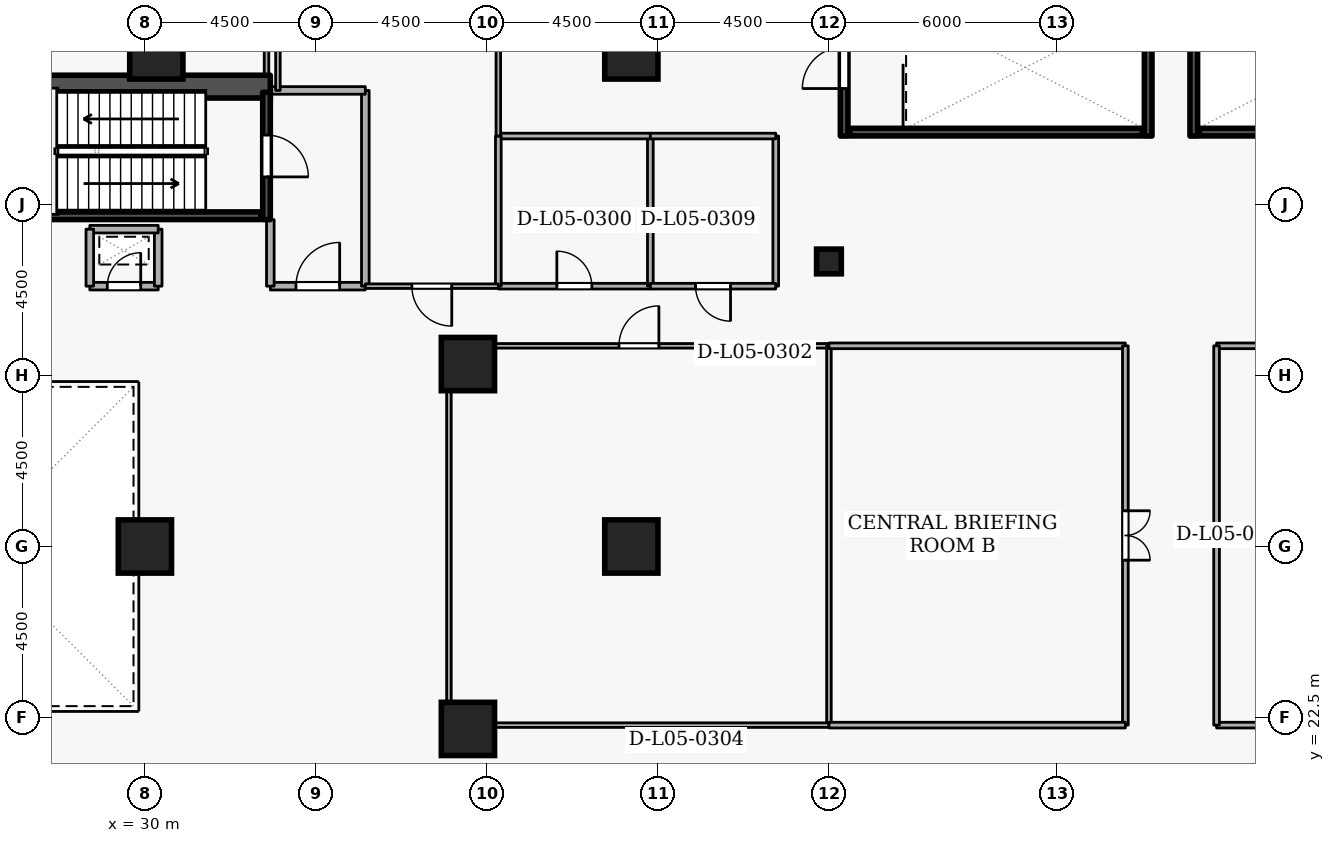
"""IFC4 building model, lengths in metres.
Left out: names, types, materials, properties, quantities, classifications, styles, units other than length and angle.
Written with IfcOpenShell. Run it as: python <this file> out.ifc"""

import sys

from ifc_helpers import new_model, si_unit, direction, frame, frame_2d, origin, origin_2d, place, context, subcontext, project, spatial, rectangle, extrude, element, fill, save


model = new_model("IFC4")
c1 = context("Model", 3, precision=1e-05, world=origin(), true_north=direction((0.0, 1.0)))
c2 = subcontext(c1, "Body", "Model", "MODEL_VIEW")
j1 = project(units=[si_unit("LENGTHUNIT", "METRE"), si_unit("PLANEANGLEUNIT", "RADIAN")], contexts=[c1])
p1 = place(None, origin())
s1 = spatial("IfcSite", under=j1, at=p1, CompositionType="ELEMENT")
p2 = place(p1, origin())
s2 = spatial("IfcBuilding", under=s1, at=p2, CompositionType="ELEMENT")
p3 = place(p2, frame((0.0, 0.0, 23.1)))
s3 = spatial("IfcBuildingStorey", under=s2, at=p3, CompositionType="ELEMENT", Elevation=23.1)
p4 = place(p3, frame((17.7, 39.1, 0.0), z_axis=(0.0, 0.0, 1.0), x_axis=(1.0, 0.0, 0.0)))
e1 = element("IfcWall", 1, at=p4, inside=s3, PredefinedType="SHEAR", context=c2, shape_type="SweptSolid", body=[
    extrude(rectangle(XDim=15.6, YDim=0.6, at=frame_2d((7.8, 0.0))), origin(), (0.0, 0.0, 1.0), 4.8),
])
for number, where, z_axis, x_axis in (
    (2, (42.8, 27.0, 0.0), (0.0, 0.0, 1.0), (1.0, 0.0, 0.0)),
    (3, (42.8, 40.0, 0.0), (0.0, 0.0, 1.0), (1.0, 0.0, 0.0)),
    (4, (38.5, 22.2, 0.0), (0.0, 0.0, 1.0), (1.0, 0.0, 0.0)),
    (5, (38.5, 31.8, 0.0), (0.0, 0.0, 1.0), (1.0, 0.0, 0.0)),
    (6, (30.3, 40.0, 0.0), (0.0, 0.0, 1.0), (1.0, 0.0, 0.0)),
    (7, (30.0, 27.0, 0.0), (0.0, 0.0, 1.0), (1.0, 0.0, 0.0)),
):
    element("IfcColumn", number, at=place(p3, frame(where, z_axis=z_axis, x_axis=x_axis)), inside=s3, PredefinedType="COLUMN", context=c2, shape_type="SweptSolid", body=[
        extrude(rectangle(XDim=1.4, YDim=1.4, at=origin_2d()), origin(), (0.0, 0.0, 1.0), 4.8),
    ])
p5 = place(p3, frame((48.0, 34.5, 0.0), z_axis=(0.0, 0.0, 1.0), x_axis=(1.0, 0.0, 0.0)))
e8 = element("IfcColumn", 8, at=p5, inside=s3, PredefinedType="COLUMN", context=c2, shape_type="SweptSolid", body=[
    extrude(rectangle(XDim=0.65, YDim=0.65, at=origin_2d()), origin(), (0.0, 0.0, 1.0), 4.8),
])
p6 = place(p3, frame((33.2, 38.95, 0.0), z_axis=(0.0, 0.0, 1.0), x_axis=(0.0, -1.0, 0.0)))
e9 = element("IfcWall", 9, at=p6, inside=s3, PredefinedType="SHEAR", context=c2, shape_type="SweptSolid", body=[
    extrude(rectangle(XDim=3.35, YDim=0.2, at=frame_2d((1.675, 0.0))), origin(), (0.0, 0.0, 1.0), 4.8),
])
p7 = place(p6, frame((1.125, 0.0, 0.0)))
e10 = element("IfcOpeningElement", 10, at=p7, cuts=e9, PredefinedType="OPENING", context=c2, shape_type="SweptSolid", body=[
    extrude(rectangle(XDim=1.1, YDim=2.1, at=frame_2d((0.55, 1.05))), frame((0.0, 0.11, 0.0), z_axis=(0.0, -1.0, 0.0), x_axis=(1.0, 0.0, 0.0)), (0.0, 0.0, 1.0), 0.22),
])
p8 = place(p3, frame((25.95, 35.703, 0.0), z_axis=(0.0, 0.0, 1.0), x_axis=(1.0, 0.0, 0.0)))
e11 = element("IfcWall", 11, at=p8, inside=s3, PredefinedType="SHEAR", context=c2, shape_type="SweptSolid", body=[
    extrude(rectangle(XDim=7.1, YDim=0.2, at=frame_2d((3.55, 0.0))), origin(), (0.0, 0.0, 1.0), 4.8),
])
p9 = place(p3, frame((48.4, 37.8, 0.0), z_axis=(0.0, 0.0, 1.0), x_axis=(0.0, 1.0, 0.0)))
e12 = element("IfcWall", 12, at=p9, inside=s3, PredefinedType="SHEAR", context=c2, shape_type="SweptSolid", body=[
    extrude(rectangle(XDim=3.6, YDim=0.2, at=frame_2d((1.8, 0.0))), origin(), (0.0, 0.0, 1.0), 4.8),
])
p10 = place(p9, frame((1.25, 0.0, 0.0)))
e13 = element("IfcOpeningElement", 13, at=p10, cuts=e12, PredefinedType="OPENING", context=c2, shape_type="SweptSolid", body=[
    extrude(rectangle(XDim=1.1, YDim=2.1, at=frame_2d((0.55, 1.05))), frame((0.0, 0.11, 0.0), z_axis=(0.0, -1.0, 0.0), x_axis=(1.0, 0.0, 0.0)), (0.0, 0.0, 1.0), 0.22),
])
p11 = place(p3, frame((56.4, 41.4, 0.0), z_axis=(0.0, 0.0, 1.0), x_axis=(0.0, -1.0, 0.0)))
e14 = element("IfcWall", 14, at=p11, inside=s3, PredefinedType="SHEAR", context=c2, shape_type="SweptSolid", body=[
    extrude(rectangle(XDim=3.6, YDim=0.2, at=frame_2d((1.8, 0.0))), origin(), (0.0, 0.0, 1.0), 4.8),
])
p12 = place(p3, frame((48.55, 37.903, 0.0), z_axis=(0.0, 0.0, 1.0), x_axis=(1.0, 0.0, 0.0)))
e15 = element("IfcWall", 15, at=p12, inside=s3, PredefinedType="SHEAR", context=c2, shape_type="SweptSolid", body=[
    extrude(rectangle(XDim=7.7, YDim=0.2, at=frame_2d((3.85, 0.0))), origin(), (0.0, 0.0, 1.0), 4.8),
])
p13 = place(p3, frame((57.6, 37.8, 0.0), z_axis=(0.0, 0.0, 1.0), x_axis=(0.0, 1.0, 0.0)))
e16 = element("IfcWall", 16, at=p13, inside=s3, PredefinedType="SHEAR", context=c2, shape_type="SweptSolid", body=[
    extrude(rectangle(XDim=3.6, YDim=0.2, at=frame_2d((1.8, 0.0))), origin(), (0.0, 0.0, 1.0), 4.8),
])
p14 = place(p3, frame((57.75, 37.903, 0.0), z_axis=(0.0, 0.0, 1.0), x_axis=(1.0, 0.0, 0.0)))
e17 = element("IfcWall", 17, at=p14, inside=s3, PredefinedType="SHEAR", context=c2, shape_type="SweptSolid", body=[
    extrude(rectangle(XDim=7.7, YDim=0.2, at=frame_2d((3.85, 0.0))), origin(), (0.0, 0.0, 1.0), 4.8),
])
p15 = place(p3, frame((33.3, 33.85, 0.0), z_axis=(0.0, 0.0, 1.0), x_axis=(1.0, 0.0, 0.0)))
e18 = element("IfcWall", 18, at=p15, inside=s3, PredefinedType="STANDARD", context=c2, shape_type="SweptSolid", body=[
    extrude(rectangle(XDim=2.5, YDim=0.2, at=frame_2d((1.25, 0.0))), origin(), (0.0, 0.0, 1.0), 4.54),
])
p16 = place(p15, frame((0.675, 0.0, 0.0)))
e19 = element("IfcOpeningElement", 19, at=p16, cuts=e18, PredefinedType="OPENING", context=c2, shape_type="SweptSolid", body=[
    extrude(rectangle(XDim=1.15, YDim=2.1, at=frame_2d((0.575, 1.05))), frame((0.0, 0.11, 0.0), z_axis=(0.0, -1.0, 0.0), x_axis=(1.0, 0.0, 0.0)), (0.0, 0.0, 1.0), 0.22),
])
p17 = place(p3, frame((35.8, 33.85, 0.0), z_axis=(0.0, 0.0, 1.0), x_axis=(0.0, 1.0, 0.0)))
e20 = element("IfcWall", 20, at=p17, inside=s3, PredefinedType="STANDARD", context=c2, shape_type="SweptSolid", body=[
    extrude(rectangle(XDim=5.15, YDim=0.2, at=frame_2d((2.575, 0.0))), origin(), (0.0, 0.0, 1.0), 4.54),
])
p18 = place(p3, frame((35.8, 39.0, 0.0), z_axis=(0.0, 0.0, 1.0), x_axis=(-1.0, 0.0, 0.0)))
e21 = element("IfcWall", 21, at=p18, inside=s3, PredefinedType="STANDARD", context=c2, shape_type="SweptSolid", body=[
    extrude(rectangle(XDim=2.5, YDim=0.2, at=frame_2d((1.25, 0.0))), origin(), (0.0, 0.0, 1.0), 4.54),
])
p19 = place(p3, frame((33.3, 35.6, 0.0), z_axis=(0.0, 0.0, 1.0), x_axis=(0.0, -1.0, 0.0)))
e22 = element("IfcWall", 22, at=p19, inside=s3, PredefinedType="STANDARD", context=c2, shape_type="SweptSolid", body=[
    extrude(rectangle(XDim=1.75, YDim=0.2, at=frame_2d((0.875, 0.0))), origin(), (0.0, 0.0, 1.0), 3.745),
])
p20 = place(p3, frame((28.55, 33.85, 0.0), z_axis=(0.0, 0.0, 1.0), x_axis=(1.0, 0.0, 0.0)))
e23 = element("IfcWall", 23, at=p20, inside=s3, PredefinedType="STANDARD", context=c2, shape_type="SweptSolid", body=[
    extrude(rectangle(XDim=1.8, YDim=0.2, at=frame_2d((0.9, 0.0))), origin(), (0.0, 0.0, 1.0), 4.54),
])
p21 = place(p20, frame((0.46, 0.0, 0.0)))
e24 = element("IfcOpeningElement", 24, at=p21, cuts=e23, PredefinedType="OPENING", context=c2, shape_type="SweptSolid", body=[
    extrude(rectangle(XDim=0.88, YDim=2.04, at=frame_2d((0.44, 1.02))), frame((0.0, 0.11, 0.0), z_axis=(0.0, -1.0, 0.0), x_axis=(1.0, 0.0, 0.0)), (0.0, 0.0, 1.0), 0.22),
])
p22 = place(p3, frame((30.35, 33.85, 0.0), z_axis=(0.0, 0.0, 1.0), x_axis=(0.0, 1.0, 0.0)))
e25 = element("IfcWall", 25, at=p22, inside=s3, PredefinedType="STANDARD", context=c2, shape_type="SweptSolid", body=[
    extrude(rectangle(XDim=1.5, YDim=0.2, at=frame_2d((0.75, 0.0))), origin(), (0.0, 0.0, 1.0), 4.54),
])
p23 = place(p3, frame((30.35, 35.35, 0.0), z_axis=(0.0, 0.0, 1.0), x_axis=(-1.0, 0.0, 0.0)))
e26 = element("IfcWall", 26, at=p23, inside=s3, PredefinedType="STANDARD", context=c2, shape_type="SweptSolid", body=[
    extrude(rectangle(XDim=1.8, YDim=0.2, at=frame_2d((0.9, 0.0))), origin(), (0.0, 0.0, 1.0), 4.54),
])
p24 = place(p3, frame((28.55, 35.35, 0.0), z_axis=(0.0, 0.0, 1.0), x_axis=(0.0, -1.0, 0.0)))
e27 = element("IfcWall", 27, at=p24, inside=s3, PredefinedType="STANDARD", context=c2, shape_type="SweptSolid", body=[
    extrude(rectangle(XDim=1.5, YDim=0.2, at=frame_2d((0.75, 0.0))), origin(), (0.0, 0.0, 1.0), 4.54),
])
p25 = place(p3, frame((39.3, 33.85, 0.0), z_axis=(0.0, 0.0, 1.0), x_axis=(1.0, 0.0, 0.0)))
e28 = element("IfcWall", 28, at=p25, inside=s3, PredefinedType="PARTITIONING", context=c2, shape_type="SweptSolid", body=[
    extrude(rectangle(XDim=4.0, YDim=0.15, at=frame_2d((2.0, 0.0))), origin(), (0.0, 0.0, 1.0), 4.54),
])
p26 = place(p25, frame((1.54, 0.0, 0.0)))
e29 = element("IfcOpeningElement", 29, at=p26, cuts=e28, PredefinedType="OPENING", context=c2, shape_type="SweptSolid", body=[
    extrude(rectangle(XDim=0.92, YDim=2.08, at=frame_2d((0.46, 1.04))), frame((0.0, 0.085, 0.0), z_axis=(0.0, -1.0, 0.0), x_axis=(1.0, 0.0, 0.0)), (0.0, 0.0, 1.0), 0.17),
])
p27 = place(p3, frame((43.3, 33.85, 0.0), z_axis=(0.0, 0.0, 1.0), x_axis=(0.0, 1.0, 0.0)))
e30 = element("IfcWall", 30, at=p27, inside=s3, PredefinedType="PARTITIONING", context=c2, shape_type="SweptSolid", body=[
    extrude(rectangle(XDim=3.95, YDim=0.15, at=frame_2d((1.975, 0.0))), origin(), (0.0, 0.0, 1.0), 4.54),
])
p28 = place(p3, frame((43.3, 37.8, 0.0), z_axis=(0.0, 0.0, 1.0), x_axis=(-1.0, 0.0, 0.0)))
e31 = element("IfcWall", 31, at=p28, inside=s3, PredefinedType="PARTITIONING", context=c2, shape_type="SweptSolid", body=[
    extrude(rectangle(XDim=4.0, YDim=0.15, at=frame_2d((2.0, 0.0))), origin(), (0.0, 0.0, 1.0), 4.54),
])
for number, where, z_axis, x_axis in (
    (32, (39.3, 37.8, 0.0), (0.0, 0.0, 1.0), (0.0, -1.0, 0.0)),
    (33, (46.6, 37.8, 0.0), (0.0, 0.0, 1.0), (0.0, -1.0, 0.0)),
):
    element("IfcWall", number, at=place(p3, frame(where, z_axis=z_axis, x_axis=x_axis)), inside=s3, PredefinedType="PARTITIONING", context=c2, shape_type="SweptSolid", body=[
        extrude(rectangle(XDim=3.95, YDim=0.15, at=frame_2d((1.975, 0.0))), origin(), (0.0, 0.0, 1.0), 4.54),
    ])
p29 = place(p3, frame((46.6, 33.85, 0.0), z_axis=(0.0, 0.0, 1.0), x_axis=(-1.0, 0.0, 0.0)))
e34 = element("IfcWall", 34, at=p29, inside=s3, PredefinedType="PARTITIONING", context=c2, shape_type="SweptSolid", body=[
    extrude(rectangle(XDim=3.3, YDim=0.15, at=frame_2d((1.65, 0.0))), origin(), (0.0, 0.0, 1.0), 4.54),
])
p30 = place(p29, frame((1.19, 0.0, 0.0)))
e35 = element("IfcOpeningElement", 35, at=p30, cuts=e34, PredefinedType="OPENING", context=c2, shape_type="SweptSolid", body=[
    extrude(rectangle(XDim=0.92, YDim=2.08, at=frame_2d((0.46, 1.04))), frame((0.0, 0.085, 0.0), z_axis=(0.0, -1.0, 0.0), x_axis=(1.0, 0.0, 0.0)), (0.0, 0.0, 1.0), 0.17),
])
p31 = place(p3, frame((43.3, 37.8, 0.0), z_axis=(0.0, 0.0, 1.0), x_axis=(1.0, 0.0, 0.0)))
e36 = element("IfcWall", 36, at=p31, inside=s3, PredefinedType="PARTITIONING", context=c2, shape_type="SweptSolid", body=[
    extrude(rectangle(XDim=3.3, YDim=0.15, at=frame_2d((1.65, 0.0))), origin(), (0.0, 0.0, 1.0), 4.54),
])
p32 = place(p3, frame((38.0, 32.28, 0.0), z_axis=(0.0, 0.0, 1.0), x_axis=(1.0, 0.0, 0.0)))
e37 = element("IfcWall", 37, at=p32, inside=s3, PredefinedType="PARTITIONING", context=c2, shape_type="SweptSolid", body=[
    extrude(rectangle(XDim=10.0, YDim=0.12, at=frame_2d((5.0, 0.0))), origin(), (0.0, 0.0, 1.0), 4.54),
])
p33 = place(p32, frame((4.475, 0.0, 0.0)))
e38 = element("IfcOpeningElement", 38, at=p33, cuts=e37, PredefinedType="OPENING", context=c2, shape_type="SweptSolid", body=[
    extrude(rectangle(XDim=1.05, YDim=2.1, at=frame_2d((0.525, 1.05))), frame((0.0, 0.07, 0.0), z_axis=(0.0, -1.0, 0.0), x_axis=(1.0, 0.0, 0.0)), (0.0, 0.0, 1.0), 0.14),
])
p34 = place(p3, frame((48.0, 32.28, 0.0), z_axis=(0.0, 0.0, 1.0), x_axis=(0.0, -1.0, 0.0)))
e39 = element("IfcWall", 39, at=p34, inside=s3, PredefinedType="PARTITIONING", context=c2, shape_type="SweptSolid", body=[
    extrude(rectangle(XDim=9.98, YDim=0.12, at=frame_2d((4.99, 0.0))), origin(), (0.0, 0.0, 1.0), 3.694),
])
p35 = place(p3, frame((48.0, 22.3, 0.0), z_axis=(0.0, 0.0, 1.0), x_axis=(-1.0, 0.0, 0.0)))
e40 = element("IfcWall", 40, at=p35, inside=s3, PredefinedType="PARTITIONING", context=c2, shape_type="SweptSolid", body=[
    extrude(rectangle(XDim=10.0, YDim=0.12, at=frame_2d((5.0, 0.0))), origin(), (0.0, 0.0, 1.0), 4.54),
])
p36 = place(p3, frame((38.0, 22.3, 0.0), z_axis=(0.0, 0.0, 1.0), x_axis=(0.0, 1.0, 0.0)))
e41 = element("IfcWall", 41, at=p36, inside=s3, PredefinedType="PARTITIONING", context=c2, shape_type="SweptSolid", body=[
    extrude(rectangle(XDim=9.98, YDim=0.12, at=frame_2d((4.99, 0.0))), origin(), (0.0, 0.0, 1.0), 4.54),
])
p37 = place(p3, frame((58.2, 32.28, 0.0), z_axis=(0.0, 0.0, 1.0), x_axis=(1.0, 0.0, 0.0)))
e42 = element("IfcWall", 42, at=p37, inside=s3, PredefinedType="PARTITIONING", context=c2, shape_type="SweptSolid", body=[
    extrude(rectangle(XDim=13.85, YDim=0.15, at=frame_2d((6.925, 0.0))), origin(), (0.0, 0.0, 1.0), 4.54),
])
p38 = place(p37, frame((6.275, 0.0, 0.0)))
e43 = element("IfcOpeningElement", 43, at=p38, cuts=e42, PredefinedType="OPENING", context=c2, shape_type="SweptSolid", body=[
    extrude(rectangle(XDim=1.3, YDim=2.12, at=frame_2d((0.65, 1.06))), frame((0.0, 0.085, 0.0), z_axis=(0.0, -1.0, 0.0), x_axis=(1.0, 0.0, 0.0)), (0.0, 0.0, 1.0), 0.17),
])
p39 = place(p3, frame((72.05, 22.3, 0.0), z_axis=(0.0, 0.0, 1.0), x_axis=(-1.0, 0.0, 0.0)))
e44 = element("IfcWall", 44, at=p39, inside=s3, PredefinedType="PARTITIONING", context=c2, shape_type="SweptSolid", body=[
    extrude(rectangle(XDim=13.85, YDim=0.15, at=frame_2d((6.925, 0.0))), origin(), (0.0, 0.0, 1.0), 4.54),
])
p40 = place(p3, frame((58.2, 22.3, 0.0), z_axis=(0.0, 0.0, 1.0), x_axis=(0.0, 1.0, 0.0)))
e45 = element("IfcWall", 45, at=p40, inside=s3, PredefinedType="PARTITIONING", context=c2, shape_type="SweptSolid", body=[
    extrude(rectangle(XDim=9.98, YDim=0.15, at=frame_2d((4.99, 0.0))), origin(), (0.0, 0.0, 1.0), 4.54),
])
p41 = place(p3, frame((39.3, 49.18, 0.0), z_axis=(0.0, 0.0, 1.0), x_axis=(0.0, -1.0, 0.0)))
e46 = element("IfcWall", 46, at=p41, inside=s3, PredefinedType="PARTITIONING", context=c2, shape_type="SweptSolid", body=[
    extrude(rectangle(XDim=11.38, YDim=0.12, at=frame_2d((5.69, 0.0))), origin(), (0.0, 0.0, 1.0), 4.54),
])
p42 = place(p3, frame((39.3, 33.85, 0.0), z_axis=(0.0, 0.0, 1.0), x_axis=(-1.0, 0.0, 0.0)))
e47 = element("IfcWall", 47, at=p42, inside=s3, PredefinedType="PARTITIONING", context=c2, shape_type="SweptSolid", body=[
    extrude(rectangle(XDim=3.5, YDim=0.12, at=frame_2d((1.75, 0.0))), origin(), (0.0, 0.0, 1.0), 4.54),
])
p43 = place(p42, frame((1.225, 0.0, 0.0)))
e48 = element("IfcOpeningElement", 48, at=p43, cuts=e47, PredefinedType="OPENING", context=c2, shape_type="SweptSolid", body=[
    extrude(rectangle(XDim=1.05, YDim=2.1, at=frame_2d((0.525, 1.05))), frame((0.0, 0.07, 0.0), z_axis=(0.0, -1.0, 0.0), x_axis=(1.0, 0.0, 0.0)), (0.0, 0.0, 1.0), 0.14),
])
p44 = place(p3, frame((33.5, 39.0, 0.0), z_axis=(0.0, 0.0, 1.0), x_axis=(0.0, 1.0, 0.0)))
e49 = element("IfcWall", 49, at=p44, inside=s3, PredefinedType="PARTITIONING", context=c2, shape_type="SweptSolid", body=[
    extrude(rectangle(XDim=10.18, YDim=0.12, at=frame_2d((5.09, 0.0))), origin(), (0.0, 0.0, 1.0), 4.54),
])
p45 = place(p3, frame((33.2, 49.18, 0.0), z_axis=(0.0, 0.0, 1.0), x_axis=(0.0, -1.0, 0.0)))
e50 = element("IfcWall", 50, at=p45, inside=s3, PredefinedType="PARTITIONING", context=c2, shape_type="SweptSolid", body=[
    extrude(rectangle(XDim=9.98, YDim=0.12, at=frame_2d((4.99, 0.0))), origin(), (0.0, 0.0, 1.0), 4.54),
])
p46 = place(p3, frame((48.0, 32.28, 0.0), z_axis=(0.0, 0.0, 1.0), x_axis=(1.0, 0.0, 0.0)))
e51 = element("IfcWall", 51, at=p46, inside=s3, PredefinedType="PARTITIONING", context=c2, shape_type="SweptSolid", body=[
    extrude(rectangle(XDim=7.8, YDim=0.15, at=frame_2d((3.9, 0.0))), origin(), (0.0, 0.0, 1.0), 4.54),
])
p47 = place(p3, frame((55.8, 32.28, 0.0), z_axis=(0.0, 0.0, 1.0), x_axis=(0.0, -1.0, 0.0)))
e52 = element("IfcWall", 52, at=p47, inside=s3, PredefinedType="PARTITIONING", context=c2, shape_type="SweptSolid", body=[
    extrude(rectangle(XDim=9.98, YDim=0.15, at=frame_2d((4.99, 0.0))), origin(), (0.0, 0.0, 1.0), 4.54),
])
p48 = place(p47, frame((4.34, 0.0, 0.0)))
e53 = element("IfcOpeningElement", 53, at=p48, cuts=e52, PredefinedType="OPENING", context=c2, shape_type="SweptSolid", body=[
    extrude(rectangle(XDim=1.3, YDim=2.12, at=frame_2d((0.65, 1.06))), frame((0.0, 0.085, 0.0), z_axis=(0.0, -1.0, 0.0), x_axis=(1.0, 0.0, 0.0)), (0.0, 0.0, 1.0), 0.17),
])
p49 = place(p3, frame((55.8, 22.3, 0.0), z_axis=(0.0, 0.0, 1.0), x_axis=(-1.0, 0.0, 0.0)))
e54 = element("IfcWall", 54, at=p49, inside=s3, PredefinedType="PARTITIONING", context=c2, shape_type="SweptSolid", body=[
    extrude(rectangle(XDim=7.8, YDim=0.15, at=frame_2d((3.9, 0.0))), origin(), (0.0, 0.0, 1.0), 4.54),
])
p50 = place(p7, origin())
e55 = element("IfcDoor", 55, at=p50, inside=s3, OperationType="SINGLE_SWING_RIGHT", PredefinedType="DOOR", context=c2, shape_type="SweptSolid", body=[
    extrude(rectangle(XDim=1.1, YDim=2.1, at=frame_2d((0.55, 1.05))), frame((0.0, 0.025, 0.0), z_axis=(0.0, -1.0, 0.0), x_axis=(1.0, 0.0, 0.0)), (0.0, 0.0, 1.0), 0.05),
])
fill(e10, e55)
p51 = place(p10, origin())
e56 = element("IfcDoor", 56, at=p51, inside=s3, OperationType="SINGLE_SWING_LEFT", PredefinedType="DOOR", context=c2, shape_type="SweptSolid", body=[
    extrude(rectangle(XDim=1.1, YDim=2.1, at=frame_2d((0.55, 1.05))), frame((0.0, 0.025, 0.0), z_axis=(0.0, -1.0, 0.0), x_axis=(1.0, 0.0, 0.0)), (0.0, 0.0, 1.0), 0.05),
])
fill(e13, e56)
p52 = place(p16, origin())
e57 = element("IfcDoor", 57, at=p52, inside=s3, OperationType="SINGLE_SWING_RIGHT", PredefinedType="DOOR", context=c2, shape_type="SweptSolid", body=[
    extrude(rectangle(XDim=1.15, YDim=2.1, at=frame_2d((0.575, 1.05))), frame((0.0, 0.025, 0.0), z_axis=(0.0, -1.0, 0.0), x_axis=(1.0, 0.0, 0.0)), (0.0, 0.0, 1.0), 0.05),
])
fill(e19, e57)
p53 = place(p21, origin())
e58 = element("IfcDoor", 58, at=p53, inside=s3, OperationType="SINGLE_SWING_RIGHT", PredefinedType="DOOR", context=c2, shape_type="SweptSolid", body=[
    extrude(rectangle(XDim=0.88, YDim=2.04, at=frame_2d((0.44, 1.02))), frame((0.0, 0.025, 0.0), z_axis=(0.0, -1.0, 0.0), x_axis=(1.0, 0.0, 0.0)), (0.0, 0.0, 1.0), 0.05),
])
fill(e24, e58)
p54 = place(p26, origin())
e59 = element("IfcDoor", 59, at=p54, inside=s3, OperationType="SINGLE_SWING_LEFT", PredefinedType="DOOR", context=c2, shape_type="SweptSolid", body=[
    extrude(rectangle(XDim=0.92, YDim=2.08, at=frame_2d((0.46, 1.04))), frame((0.0, 0.025, 0.0), z_axis=(0.0, -1.0, 0.0), x_axis=(1.0, 0.0, 0.0)), (0.0, 0.0, 1.0), 0.05),
])
fill(e29, e59)
p55 = place(p30, origin())
e60 = element("IfcDoor", 60, at=p55, inside=s3, OperationType="SINGLE_SWING_LEFT", PredefinedType="DOOR", context=c2, shape_type="SweptSolid", body=[
    extrude(rectangle(XDim=0.92, YDim=2.08, at=frame_2d((0.46, 1.04))), frame((0.0, 0.025, 0.0), z_axis=(0.0, -1.0, 0.0), x_axis=(1.0, 0.0, 0.0)), (0.0, 0.0, 1.0), 0.05),
])
fill(e35, e60)
p56 = place(p33, origin())
e61 = element("IfcDoor", 61, at=p56, inside=s3, OperationType="SINGLE_SWING_RIGHT", PredefinedType="DOOR", context=c2, shape_type="SweptSolid", body=[
    extrude(rectangle(XDim=1.05, YDim=2.1, at=frame_2d((0.525, 1.05))), frame((0.0, 0.025, 0.0), z_axis=(0.0, -1.0, 0.0), x_axis=(1.0, 0.0, 0.0)), (0.0, 0.0, 1.0), 0.05),
])
fill(e38, e61)
p57 = place(p43, origin())
e62 = element("IfcDoor", 62, at=p57, inside=s3, OperationType="SINGLE_SWING_LEFT", PredefinedType="DOOR", context=c2, shape_type="SweptSolid", body=[
    extrude(rectangle(XDim=1.05, YDim=2.1, at=frame_2d((0.525, 1.05))), frame((0.0, 0.025, 0.0), z_axis=(0.0, -1.0, 0.0), x_axis=(1.0, 0.0, 0.0)), (0.0, 0.0, 1.0), 0.05),
])
fill(e48, e62)
p58 = place(p48, origin())
e63 = element("IfcDoor", 63, at=p58, inside=s3, OperationType="DOUBLE_DOOR_SINGLE_SWING", PredefinedType="DOOR", context=c2, shape_type="SweptSolid", body=[
    extrude(rectangle(XDim=1.3, YDim=2.12, at=frame_2d((0.65, 1.06))), frame((0.0, 0.025, 0.0), z_axis=(0.0, -1.0, 0.0), x_axis=(1.0, 0.0, 0.0)), (0.0, 0.0, 1.0), 0.05),
])
fill(e53, e63)
save(model, sys.argv[1])
